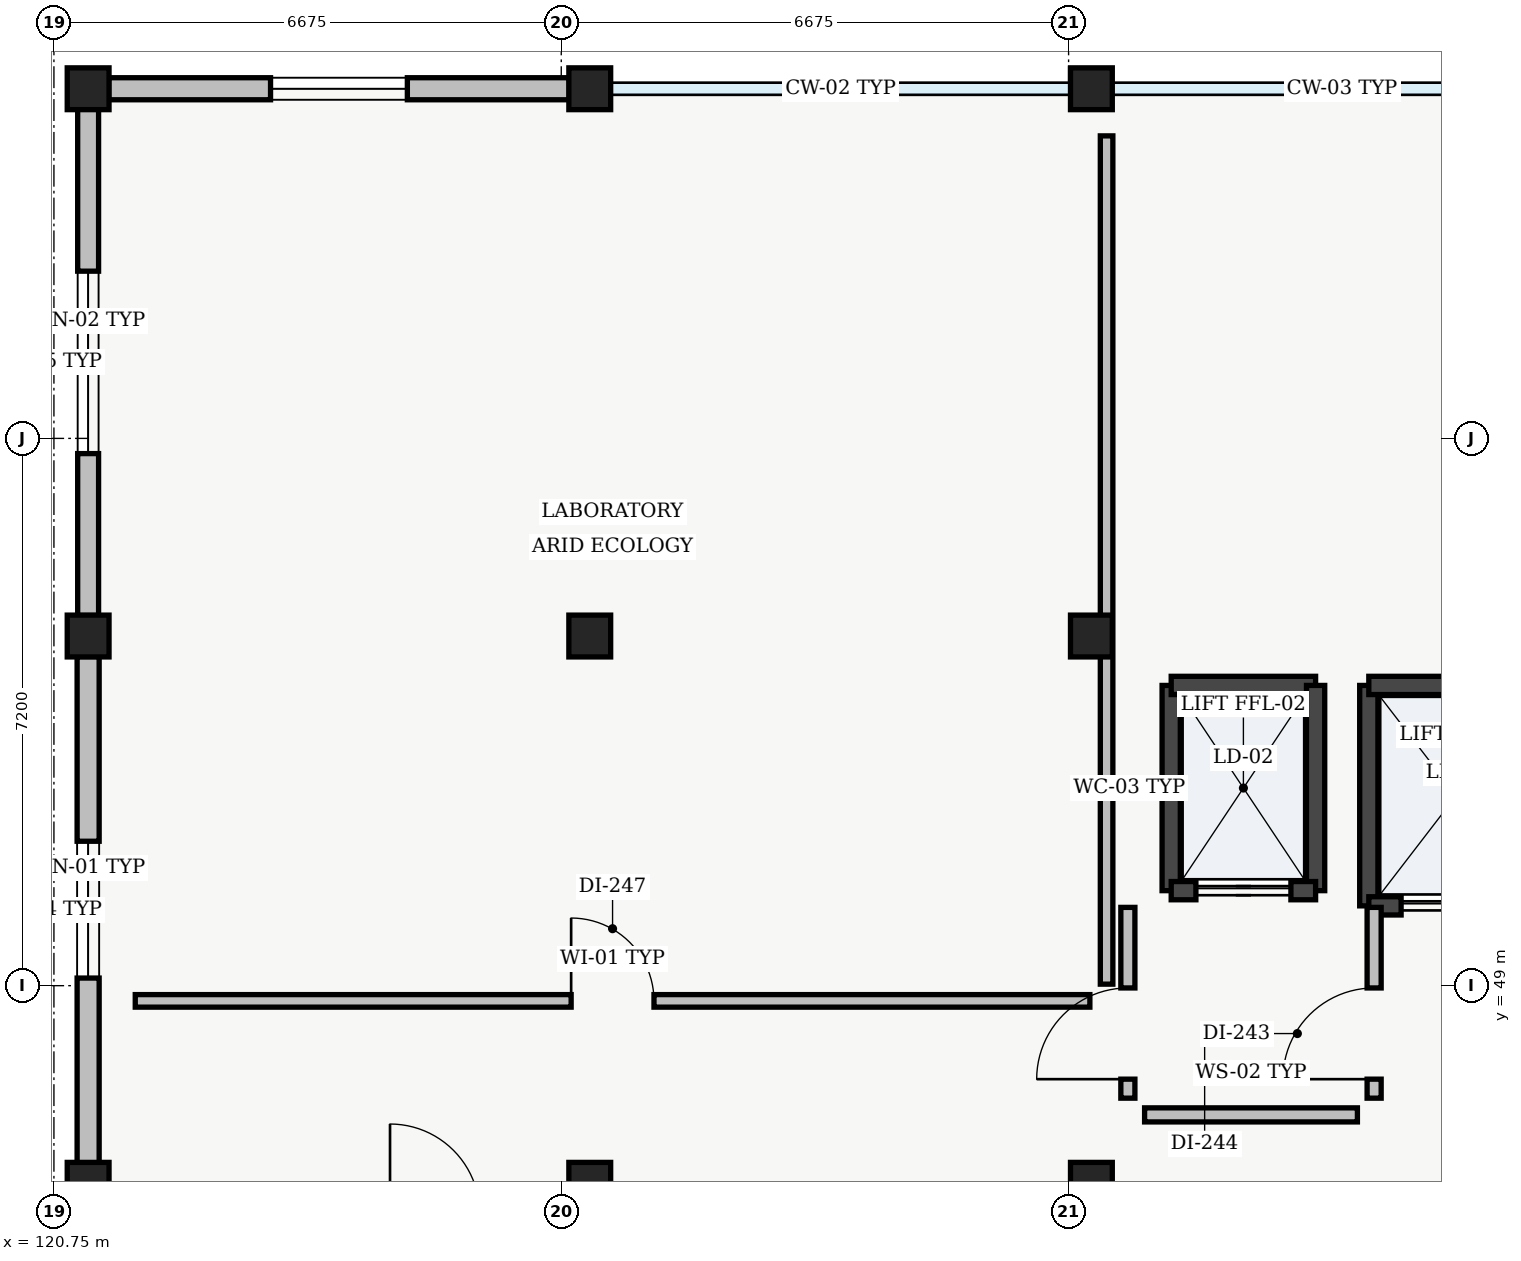
"""IFC4 building model, lengths in metres.
Left out: names, types, materials, properties, quantities, classifications, styles, units other than length and angle.
Written with IfcOpenShell. Run it as: python <this file> out.ifc"""

import sys

from ifc_helpers import new_model, si_unit, direction, frame, frame_2d, origin, origin_2d, place, context, subcontext, project, spatial, rectangle, extrude, element, fill, save


model = new_model("IFC4")
c1 = context("Model", 3, precision=1e-05, world=origin(), true_north=direction((0.0, 1.0)))
c2 = subcontext(c1, "Body", "Model", "MODEL_VIEW")
j1 = project(units=[si_unit("LENGTHUNIT", "METRE"), si_unit("PLANEANGLEUNIT", "RADIAN")], contexts=[c1])
p1 = place(None, origin())
s1 = spatial("IfcSite", under=j1, at=p1, CompositionType="ELEMENT")
p2 = place(p1, origin())
s2 = spatial("IfcBuilding", under=s1, at=p2, CompositionType="ELEMENT")
p3 = place(p2, frame((0.0, 0.0, 27.6)))
s3 = spatial("IfcBuildingStorey", under=s2, at=p3, CompositionType="ELEMENT", Elevation=27.6)
for number, where, z_axis, x_axis in (
    (1, (121.2, 46.4, 0.0), (0.0, 0.0, 1.0), (1.0, 0.0, 0.0)),
    (2, (121.2, 53.6, 0.0), (0.0, 0.0, 1.0), (1.0, 0.0, 0.0)),
    (3, (121.2, 60.8, 0.0), (0.0, 0.0, 1.0), (1.0, 0.0, 0.0)),
    (4, (127.8, 46.4, 0.0), (0.0, 0.0, 1.0), (1.0, 0.0, 0.0)),
    (5, (127.8, 53.6, 0.0), (0.0, 0.0, 1.0), (1.0, 0.0, 0.0)),
    (6, (127.8, 60.8, 0.0), (0.0, 0.0, 1.0), (1.0, 0.0, 0.0)),
    (7, (134.4, 46.4, 0.0), (0.0, 0.0, 1.0), (1.0, 0.0, 0.0)),
    (8, (134.4, 53.6, 0.0), (0.0, 0.0, 1.0), (1.0, 0.0, 0.0)),
    (9, (134.4, 60.8, 0.0), (0.0, 0.0, 1.0), (1.0, 0.0, 0.0)),
):
    element("IfcColumn", number, at=place(p3, frame(where, z_axis=z_axis, x_axis=x_axis)), inside=s3, PredefinedType="COLUMN", context=c2, shape_type="SweptSolid", body=[
        extrude(rectangle(XDim=0.55, YDim=0.55, at=origin_2d()), origin(), (0.0, 0.0, 1.0), 4.3),
    ])
p4 = place(p3, frame((121.2, 46.67, 0.0), z_axis=(0.0, 0.0, 1.0), x_axis=(0.0, 1.0, 0.0)))
e10 = element("IfcWall", 10, at=p4, inside=s3, PredefinedType="STANDARD", context=c2, shape_type="SweptSolid", body=[
    extrude(rectangle(XDim=6.66, YDim=0.29, at=frame_2d((3.33, 0.0))), origin(), (0.0, 0.0, 1.0), 3.835),
])
p5 = place(p4, frame((2.43, 0.0, 0.95)))
e11 = element("IfcOpeningElement", 11, at=p5, cuts=e10, PredefinedType="OPENING", context=c2, shape_type="SweptSolid", body=[
    extrude(rectangle(XDim=1.8, YDim=1.65, at=frame_2d((0.9, 0.825))), frame((0.0, 0.145, 0.0), z_axis=(0.0, -1.0, 0.0), x_axis=(1.0, 0.0, 0.0)), (0.0, 0.0, 1.0), 0.29),
])
p6 = place(p3, frame((121.2, 53.87, 0.0), z_axis=(0.0, 0.0, 1.0), x_axis=(0.0, 1.0, 0.0)))
e12 = element("IfcWall", 12, at=p6, inside=s3, PredefinedType="STANDARD", context=c2, shape_type="SweptSolid", body=[
    extrude(rectangle(XDim=6.66, YDim=0.275, at=frame_2d((3.33, 0.0))), origin(), (0.0, 0.0, 1.0), 3.835),
])
p7 = place(p6, frame((2.13, 0.0, 0.95)))
e13 = element("IfcOpeningElement", 13, at=p7, cuts=e12, PredefinedType="OPENING", context=c2, shape_type="SweptSolid", body=[
    extrude(rectangle(XDim=2.4, YDim=1.65, at=frame_2d((1.2, 0.825))), frame((0.0, 0.137, 0.0), z_axis=(0.0, -1.0, 0.0), x_axis=(1.0, 0.0, 0.0)), (0.0, 0.0, 1.0), 0.275),
])
p8 = place(p3, frame((121.47, 60.8, 0.0), z_axis=(0.0, 0.0, 1.0), x_axis=(1.0, 0.0, 0.0)))
e14 = element("IfcWall", 14, at=p8, inside=s3, PredefinedType="STANDARD", context=c2, shape_type="SweptSolid", body=[
    extrude(rectangle(XDim=6.06, YDim=0.29, at=frame_2d((3.03, 0.0))), origin(), (0.0, 0.0, 1.0), 3.835),
])
p9 = place(p8, frame((2.13, 0.0, 0.95)))
e15 = element("IfcOpeningElement", 15, at=p9, cuts=e14, PredefinedType="OPENING", context=c2, shape_type="SweptSolid", body=[
    extrude(rectangle(XDim=1.8, YDim=1.65, at=frame_2d((0.9, 0.825))), frame((0.0, 0.145, 0.0), z_axis=(0.0, -1.0, 0.0), x_axis=(1.0, 0.0, 0.0)), (0.0, 0.0, 1.0), 0.29),
])
p10 = place(p3, frame((135.45, 50.25, 0.0), z_axis=(0.0, 0.0, 1.0), x_axis=(0.0, 1.0, 0.0)))
e16 = element("IfcWall", 16, at=p10, inside=s3, PredefinedType="SHEAR", context=c2, shape_type="SweptSolid", body=[
    extrude(rectangle(XDim=2.7, YDim=0.24, at=frame_2d((1.35, 0.0))), origin(), (0.0, 0.0, 1.0), 4.28),
])
p11 = place(p3, frame((135.45, 52.95, 0.0), z_axis=(0.0, 0.0, 1.0), x_axis=(1.0, 0.0, 0.0)))
e17 = element("IfcWall", 17, at=p11, inside=s3, PredefinedType="SHEAR", context=c2, shape_type="SweptSolid", body=[
    extrude(rectangle(XDim=1.9, YDim=0.24, at=frame_2d((0.95, 0.0))), origin(), (0.0, 0.0, 1.0), 4.28),
])
p12 = place(p3, frame((137.35, 52.95, 0.0), z_axis=(0.0, 0.0, 1.0), x_axis=(0.0, -1.0, 0.0)))
e18 = element("IfcWall", 18, at=p12, inside=s3, PredefinedType="SHEAR", context=c2, shape_type="SweptSolid", body=[
    extrude(rectangle(XDim=2.7, YDim=0.24, at=frame_2d((1.35, 0.0))), origin(), (0.0, 0.0, 1.0), 4.28),
])
p13 = place(p3, frame((137.35, 50.25, 0.0), z_axis=(0.0, 0.0, 1.0), x_axis=(-1.0, 0.0, 0.0)))
e19 = element("IfcWall", 19, at=p13, inside=s3, PredefinedType="SHEAR", context=c2, shape_type="SweptSolid", body=[
    extrude(rectangle(XDim=1.9, YDim=0.24, at=frame_2d((0.95, 0.0))), origin(), (0.0, 0.0, 1.0), 4.28),
])
p14 = place(p13, frame((0.325, 0.0, 0.0)))
e20 = element("IfcOpeningElement", 20, at=p14, cuts=e19, PredefinedType="OPENING", context=c2, shape_type="SweptSolid", body=[
    extrude(rectangle(XDim=1.25, YDim=2.2, at=frame_2d((0.625, 1.1))), frame((0.0, 0.12, 0.0), z_axis=(0.0, -1.0, 0.0), x_axis=(1.0, 0.0, 0.0)), (0.0, 0.0, 1.0), 0.24),
])
p15 = place(p3, frame((138.05, 50.05, 0.0), z_axis=(0.0, 0.0, 1.0), x_axis=(0.0, 1.0, 0.0)))
e21 = element("IfcWall", 21, at=p15, inside=s3, PredefinedType="SHEAR", context=c2, shape_type="SweptSolid", body=[
    extrude(rectangle(XDim=2.9, YDim=0.24, at=frame_2d((1.45, 0.0))), origin(), (0.0, 0.0, 1.0), 4.28),
])
p16 = place(p3, frame((138.05, 52.95, 0.0), z_axis=(0.0, 0.0, 1.0), x_axis=(1.0, 0.0, 0.0)))
e22 = element("IfcWall", 22, at=p16, inside=s3, PredefinedType="SHEAR", context=c2, shape_type="SweptSolid", body=[
    extrude(rectangle(XDim=2.3, YDim=0.24, at=frame_2d((1.15, 0.0))), origin(), (0.0, 0.0, 1.0), 4.28),
])
p17 = place(p3, frame((140.35, 50.05, 0.0), z_axis=(0.0, 0.0, 1.0), x_axis=(-1.0, 0.0, 0.0)))
e23 = element("IfcWall", 23, at=p17, inside=s3, PredefinedType="SHEAR", context=c2, shape_type="SweptSolid", body=[
    extrude(rectangle(XDim=2.3, YDim=0.24, at=frame_2d((1.15, 0.0))), origin(), (0.0, 0.0, 1.0), 4.28),
])
p18 = place(p17, frame((0.425, 0.0, 0.0)))
e24 = element("IfcOpeningElement", 24, at=p18, cuts=e23, PredefinedType="OPENING", context=c2, shape_type="SweptSolid", body=[
    extrude(rectangle(XDim=1.45, YDim=2.3, at=frame_2d((0.725, 1.15))), frame((0.0, 0.12, 0.0), z_axis=(0.0, -1.0, 0.0), x_axis=(1.0, 0.0, 0.0)), (0.0, 0.0, 1.0), 0.24),
])
p19 = place(p3, frame((135.1, 47.3, 0.0), z_axis=(0.0, 0.0, 1.0), x_axis=(1.0, 0.0, 0.0)))
e25 = element("IfcWall", 25, at=p19, inside=s3, PredefinedType="SOLIDWALL", context=c2, shape_type="SweptSolid", body=[
    extrude(rectangle(XDim=2.8, YDim=0.185, at=frame_2d((1.4, 0.0))), origin(), (0.0, 0.0, 1.0), 3.95),
])
p20 = place(p3, frame((138.12, 47.52, 0.0), z_axis=(0.0, 0.0, 1.0), x_axis=(0.0, 1.0, 0.0)))
e26 = element("IfcWall", 26, at=p20, inside=s3, PredefinedType="SOLIDWALL", context=c2, shape_type="SweptSolid", body=[
    extrude(rectangle(XDim=2.51, YDim=0.185, at=frame_2d((1.255, 0.0))), origin(), (0.0, 0.0, 1.0), 3.95),
])
p21 = place(p20, frame((0.25, 0.0, 0.0)))
e27 = element("IfcOpeningElement", 27, at=p21, cuts=e26, PredefinedType="OPENING", context=c2, shape_type="SweptSolid", body=[
    extrude(rectangle(XDim=1.2, YDim=2.15, at=frame_2d((0.6, 1.075))), frame((0.0, 0.093, 0.0), z_axis=(0.0, -1.0, 0.0), x_axis=(1.0, 0.0, 0.0)), (0.0, 0.0, 1.0), 0.185),
])
p22 = place(p3, frame((134.88, 50.03, 0.0), z_axis=(0.0, 0.0, 1.0), x_axis=(0.0, -1.0, 0.0)))
e28 = element("IfcWall", 28, at=p22, inside=s3, PredefinedType="SOLIDWALL", context=c2, shape_type="SweptSolid", body=[
    extrude(rectangle(XDim=2.51, YDim=0.185, at=frame_2d((1.255, 0.0))), origin(), (0.0, 0.0, 1.0), 3.95),
])
p23 = place(p22, frame((1.06, 0.0, 0.0)))
e29 = element("IfcOpeningElement", 29, at=p23, cuts=e28, PredefinedType="OPENING", context=c2, shape_type="SweptSolid", body=[
    extrude(rectangle(XDim=1.2, YDim=2.15, at=frame_2d((0.6, 1.075))), frame((0.0, 0.093, 0.0), z_axis=(0.0, -1.0, 0.0), x_axis=(1.0, 0.0, 0.0)), (0.0, 0.0, 1.0), 0.185),
])
p24 = place(p3, frame((121.82, 48.8, 0.0), z_axis=(0.0, 0.0, 1.0), x_axis=(1.0, 0.0, 0.0)))
e30 = element("IfcWall", 30, at=p24, inside=s3, PredefinedType="PARTITIONING", context=c2, shape_type="SweptSolid", body=[
    extrude(rectangle(XDim=12.56, YDim=0.165, at=frame_2d((6.28, 0.0))), origin(), (0.0, 0.0, 1.0), 3.885),
])
p25 = place(p24, frame((5.735, 0.0, 0.0)))
e31 = element("IfcOpeningElement", 31, at=p25, cuts=e30, PredefinedType="OPENING", context=c2, shape_type="SweptSolid", body=[
    extrude(rectangle(XDim=1.09, YDim=2.08, at=frame_2d((0.545, 1.04))), frame((0.0, 0.083, 0.0), z_axis=(0.0, -1.0, 0.0), x_axis=(1.0, 0.0, 0.0)), (0.0, 0.0, 1.0), 0.165),
])
p26 = place(p3, frame((134.6, 49.02, 0.0), z_axis=(0.0, 0.0, 1.0), x_axis=(0.0, 1.0, 0.0)))
e32 = element("IfcWall", 32, at=p26, inside=s3, PredefinedType="PARTITIONING", context=c2, shape_type="SweptSolid", body=[
    extrude(rectangle(XDim=11.16, YDim=0.165, at=frame_2d((5.58, 0.0))), origin(), (0.0, 0.0, 1.0), 3.685),
])
p27 = place(p5, origin())
e33 = element("IfcWindow", 33, at=p27, inside=s3, PartitioningType="SINGLE_PANEL", PredefinedType="WINDOW", context=c2, shape_type="SweptSolid", body=[
    extrude(rectangle(XDim=1.8, YDim=1.65, at=frame_2d((0.9, 0.825))), frame((0.0, 0.03, 0.0), z_axis=(0.0, -1.0, 0.0), x_axis=(1.0, 0.0, 0.0)), (0.0, 0.0, 1.0), 0.06),
])
fill(e11, e33)
p28 = place(p7, origin())
e34 = element("IfcWindow", 34, at=p28, inside=s3, PartitioningType="SINGLE_PANEL", PredefinedType="WINDOW", context=c2, shape_type="SweptSolid", body=[
    extrude(rectangle(XDim=2.4, YDim=1.65, at=frame_2d((1.2, 0.825))), frame((0.0, 0.03, 0.0), z_axis=(0.0, -1.0, 0.0), x_axis=(1.0, 0.0, 0.0)), (0.0, 0.0, 1.0), 0.06),
])
fill(e13, e34)
p29 = place(p9, origin())
e35 = element("IfcWindow", 35, at=p29, inside=s3, PartitioningType="SINGLE_PANEL", PredefinedType="WINDOW", context=c2, shape_type="SweptSolid", body=[
    extrude(rectangle(XDim=1.8, YDim=1.65, at=frame_2d((0.9, 0.825))), frame((0.0, 0.03, 0.0), z_axis=(0.0, -1.0, 0.0), x_axis=(1.0, 0.0, 0.0)), (0.0, 0.0, 1.0), 0.06),
])
fill(e15, e35)
p30 = place(p14, origin())
e36 = element("IfcDoor", 36, at=p30, inside=s3, OperationType="SLIDING_TO_RIGHT", PredefinedType="DOOR", context=c2, shape_type="SweptSolid", body=[
    extrude(rectangle(XDim=1.25, YDim=2.2, at=frame_2d((0.625, 1.1))), frame((0.0, 0.025, 0.0), z_axis=(0.0, -1.0, 0.0), x_axis=(1.0, 0.0, 0.0)), (0.0, 0.0, 1.0), 0.05),
])
fill(e20, e36)
p31 = place(p18, origin())
e37 = element("IfcDoor", 37, at=p31, inside=s3, OperationType="DOUBLE_DOOR_SLIDING", PredefinedType="DOOR", context=c2, shape_type="SweptSolid", body=[
    extrude(rectangle(XDim=1.45, YDim=2.3, at=frame_2d((0.725, 1.15))), frame((0.0, 0.025, 0.0), z_axis=(0.0, -1.0, 0.0), x_axis=(1.0, 0.0, 0.0)), (0.0, 0.0, 1.0), 0.05),
])
fill(e24, e37)
p32 = place(p21, origin())
e38 = element("IfcDoor", 38, at=p32, inside=s3, OperationType="SINGLE_SWING_LEFT", PredefinedType="DOOR", context=c2, shape_type="SweptSolid", body=[
    extrude(rectangle(XDim=1.2, YDim=2.15, at=frame_2d((0.6, 1.075))), frame((0.0, 0.025, 0.0), z_axis=(0.0, -1.0, 0.0), x_axis=(1.0, 0.0, 0.0)), (0.0, 0.0, 1.0), 0.05),
])
fill(e27, e38)
p33 = place(p23, origin())
e39 = element("IfcDoor", 39, at=p33, inside=s3, OperationType="SINGLE_SWING_RIGHT", PredefinedType="DOOR", context=c2, shape_type="SweptSolid", body=[
    extrude(rectangle(XDim=1.2, YDim=2.15, at=frame_2d((0.6, 1.075))), frame((0.0, 0.025, 0.0), z_axis=(0.0, -1.0, 0.0), x_axis=(1.0, 0.0, 0.0)), (0.0, 0.0, 1.0), 0.05),
])
fill(e29, e39)
p34 = place(p25, origin())
e40 = element("IfcDoor", 40, at=p34, inside=s3, OperationType="SINGLE_SWING_LEFT", PredefinedType="DOOR", context=c2, shape_type="SweptSolid", body=[
    extrude(rectangle(XDim=1.09, YDim=2.08, at=frame_2d((0.545, 1.04))), frame((0.0, 0.025, 0.0), z_axis=(0.0, -1.0, 0.0), x_axis=(1.0, 0.0, 0.0)), (0.0, 0.0, 1.0), 0.05),
])
fill(e31, e40)
save(model, sys.argv[1])
